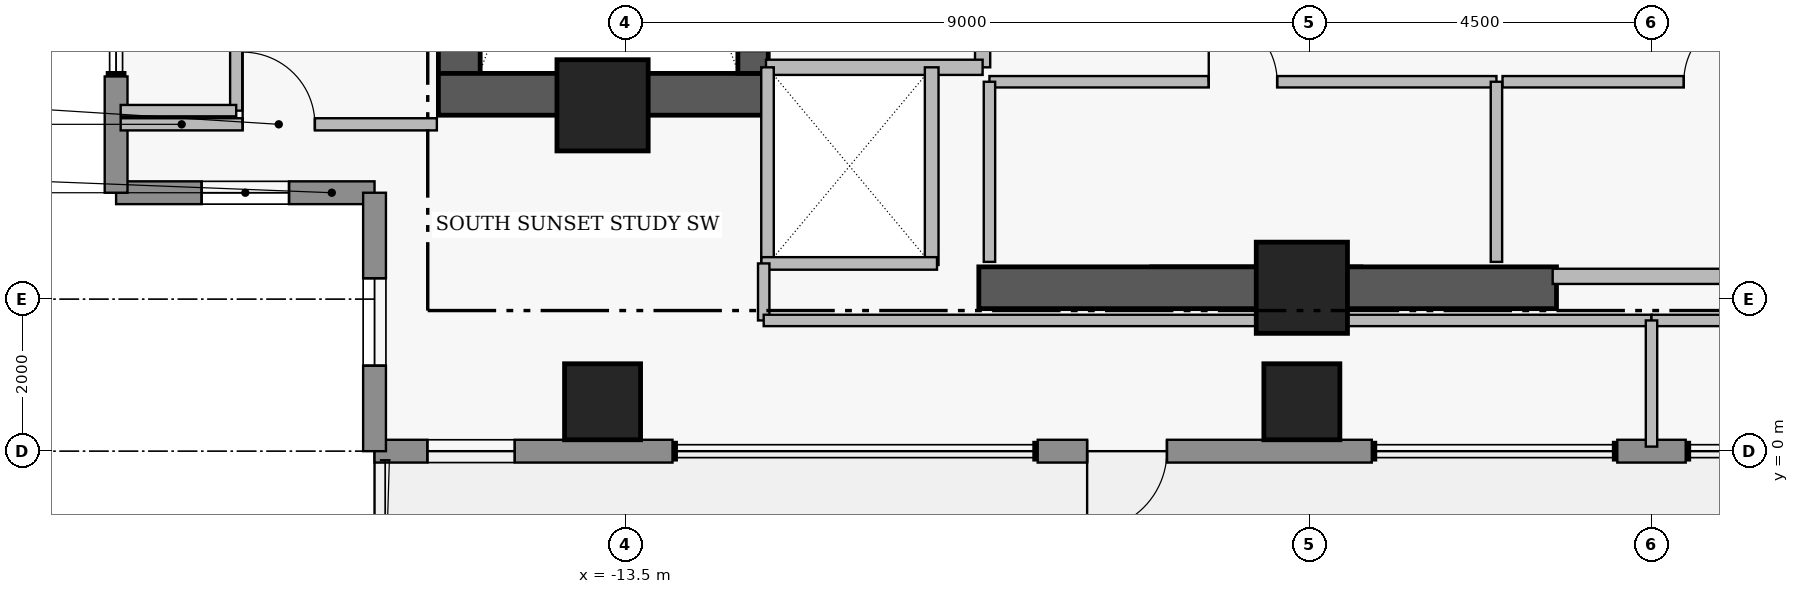
"""IFC4 building model, lengths in metres.
Left out: names, types, materials, properties, quantities, classifications, styles, units other than length and angle.
Written with IfcOpenShell. Run it as: python <this file> out.ifc"""

import sys

from ifc_helpers import new_model, si_unit, direction, frame, frame_2d, origin, origin_2d, place, context, subcontext, project, spatial, rectangle, extrude, element, fill, save


model = new_model("IFC4")
c1 = context("Model", 3, precision=1e-05, world=origin(), true_north=direction((0.0, 1.0)))
c2 = subcontext(c1, "Body", "Model", "MODEL_VIEW")
j1 = project(units=[si_unit("LENGTHUNIT", "METRE"), si_unit("PLANEANGLEUNIT", "RADIAN")], contexts=[c1])
p1 = place(None, origin())
s1 = spatial("IfcSite", under=j1, at=p1, CompositionType="ELEMENT")
p2 = place(p1, origin())
s2 = spatial("IfcBuilding", under=s1, at=p2, CompositionType="ELEMENT")
p3 = place(p2, frame((0.0, 0.0, 292.85)))
s3 = spatial("IfcBuildingStorey", under=s2, at=p3, CompositionType="ELEMENT", Elevation=292.85)
p4 = place(p3, frame((-15.685, 4.97, 0.0), z_axis=(0.0, 0.0, 1.0), x_axis=(0.0, 1.0, 0.0)))
e1 = element("IfcWall", 1, at=p4, inside=s3, PredefinedType="SHEAR", context=c2, shape_type="SweptSolid", body=[
    extrude(rectangle(XDim=8.96, YDim=0.55, at=frame_2d((4.48, 0.0))), origin(), (0.0, 0.0, 1.0), 4.21),
])
p5 = place(p3, frame((-15.96, 4.695, 0.0), z_axis=(0.0, 0.0, 1.0), x_axis=(1.0, 0.0, 0.0)))
e2 = element("IfcWall", 2, at=p5, inside=s3, PredefinedType="SHEAR", context=c2, shape_type="SweptSolid", body=[
    extrude(rectangle(XDim=4.36, YDim=0.55, at=frame_2d((2.18, 0.0))), origin(), (0.0, 0.0, 1.0), 4.21),
])
p6 = place(p3, frame((-8.85, 2.15, 0.0), z_axis=(0.0, 0.0, 1.0), x_axis=(1.0, 0.0, 0.0)))
e3 = element("IfcWall", 3, at=p6, inside=s3, PredefinedType="SHEAR", context=c2, shape_type="SweptSolid", body=[
    extrude(rectangle(XDim=7.6, YDim=0.55, at=frame_2d((3.8, 0.0))), origin(), (0.0, 0.0, 1.0), 4.16),
])
p7 = place(p3, frame((-11.82, 4.97, 0.0), z_axis=(0.0, 0.0, 1.0), x_axis=(0.0, 1.0, 0.0)))
e4 = element("IfcWall", 4, at=p7, inside=s3, PredefinedType="SHEAR", context=c2, shape_type="SweptSolid", body=[
    extrude(rectangle(XDim=8.96, YDim=0.4, at=frame_2d((4.48, 0.0))), origin(), (0.0, 0.0, 1.0), 4.21),
])
p8 = place(p7, frame((0.31, 0.0, 0.0)))
e5 = element("IfcOpeningElement", 5, at=p8, cuts=e4, PredefinedType="OPENING", context=c2, shape_type="SweptSolid", body=[
    extrude(rectangle(XDim=1.12, YDim=2.22, at=frame_2d((0.56, 1.11))), frame((0.0, 0.21, 0.0), z_axis=(0.0, -1.0, 0.0), x_axis=(1.0, 0.0, 0.0)), (0.0, 0.0, 1.0), 0.42),
])
for number, where, z_axis, x_axis in (
    (6, (-13.8, 4.55, 0.0), (0.0, 0.0, 1.0), (1.0, 0.0, 0.0)),
    (7, (-4.6, 2.15, 0.0), (0.0, 0.0, 1.0), (1.0, 0.0, 0.0)),
):
    element("IfcColumn", number, at=place(p3, frame(where, z_axis=z_axis, x_axis=x_axis)), inside=s3, PredefinedType="COLUMN", context=c2, shape_type="SweptSolid", body=[
        extrude(rectangle(XDim=1.2, YDim=1.2, at=origin_2d()), origin(), (0.0, 0.0, 1.0), 4.4),
    ])
for number, where, z_axis, x_axis in (
    (8, (-13.8, 0.65, 0.0), (0.0, 0.0, 1.0), (1.0, 0.0, 0.0)),
    (9, (-4.6, 0.65, 0.0), (0.0, 0.0, 1.0), (1.0, 0.0, 0.0)),
):
    element("IfcColumn", number, at=place(p3, frame(where, z_axis=z_axis, x_axis=x_axis)), inside=s3, PredefinedType="COLUMN", context=c2, shape_type="SweptSolid", body=[
        extrude(rectangle(XDim=1.0, YDim=1.0, at=origin_2d()), origin(), (0.0, 0.0, 1.0), 4.4),
    ])
p9 = place(p3, frame((-16.8, 3.4, 0.0), z_axis=(0.0, 0.0, 1.0), x_axis=(-1.0, 0.0, 0.0)))
e10 = element("IfcWall", 10, at=p9, inside=s3, PredefinedType="STANDARD", context=c2, shape_type="SweptSolid", body=[
    extrude(rectangle(XDim=3.4, YDim=0.3, at=frame_2d((1.7, 0.0))), origin(), (0.0, 0.0, 1.0), 4.16),
])
p10 = place(p9, frame((1.125, 0.0, 1.25)))
e11 = element("IfcOpeningElement", 11, at=p10, cuts=e10, PredefinedType="OPENING", context=c2, shape_type="SweptSolid", body=[
    extrude(rectangle(XDim=1.15, YDim=1.55, at=frame_2d((0.575, 0.775))), frame((0.0, 0.16, 0.0), z_axis=(0.0, -1.0, 0.0), x_axis=(1.0, 0.0, 0.0)), (0.0, 0.0, 1.0), 0.32),
])
p11 = place(p3, frame((-20.2, 3.4, 0.0), z_axis=(0.0, 0.0, 1.0), x_axis=(0.0, 1.0, 0.0)))
e12 = element("IfcWall", 12, at=p11, inside=s3, PredefinedType="STANDARD", context=c2, shape_type="SweptSolid", body=[
    extrude(rectangle(XDim=1.53, YDim=0.3, at=frame_2d((0.765, 0.0))), origin(), (0.0, 0.0, 1.0), 4.16),
])
p12 = place(p3, frame((0.45, 0.0, 0.0), z_axis=(0.0, 0.0, 1.0), x_axis=(-1.0, 0.0, 0.0)))
e13 = element("IfcWall", 13, at=p12, inside=s3, PredefinedType="STANDARD", context=c2, shape_type="SweptSolid", body=[
    extrude(rectangle(XDim=0.9, YDim=0.3, at=frame_2d((0.45, 0.0))), origin(), (0.0, 0.0, 1.0), 4.16),
])
p13 = place(p3, frame((-3.68, 0.0, 0.0), z_axis=(0.0, 0.0, 1.0), x_axis=(-1.0, 0.0, 0.0)))
e14 = element("IfcWall", 14, at=p13, inside=s3, PredefinedType="STANDARD", context=c2, shape_type="SweptSolid", body=[
    extrude(rectangle(XDim=4.395, YDim=0.3, at=frame_2d((2.198, 0.0))), origin(), (0.0, 0.0, 1.0), 4.16),
])
p14 = place(p13, frame((2.695, 0.0, 0.0)))
e15 = element("IfcOpeningElement", 15, at=p14, cuts=e14, PredefinedType="OPENING", context=c2, shape_type="SweptSolid", body=[
    extrude(rectangle(XDim=1.05, YDim=2.2, at=frame_2d((0.525, 1.1))), frame((0.0, 0.16, 0.0), z_axis=(0.0, -1.0, 0.0), x_axis=(1.0, 0.0, 0.0)), (0.0, 0.0, 1.0), 0.32),
])
p15 = place(p3, frame((-12.88, 0.0, 0.0), z_axis=(0.0, 0.0, 1.0), x_axis=(-1.0, 0.0, 0.0)))
e16 = element("IfcWall", 16, at=p15, inside=s3, PredefinedType="STANDARD", context=c2, shape_type="SweptSolid", body=[
    extrude(rectangle(XDim=3.92, YDim=0.3, at=frame_2d((1.96, 0.0))), origin(), (0.0, 0.0, 1.0), 4.16),
])
p16 = place(p15, frame((2.075, 0.0, 0.95)))
e17 = element("IfcOpeningElement", 17, at=p16, cuts=e16, PredefinedType="OPENING", context=c2, shape_type="SweptSolid", body=[
    extrude(rectangle(XDim=1.15, YDim=1.55, at=frame_2d((0.575, 0.775))), frame((0.0, 0.16, 0.0), z_axis=(0.0, -1.0, 0.0), x_axis=(1.0, 0.0, 0.0)), (0.0, 0.0, 1.0), 0.32),
])
p17 = place(p3, frame((-16.8, 0.0, 0.0), z_axis=(0.0, 0.0, 1.0), x_axis=(0.0, 1.0, 0.0)))
e18 = element("IfcWall", 18, at=p17, inside=s3, PredefinedType="STANDARD", context=c2, shape_type="SweptSolid", body=[
    extrude(rectangle(XDim=3.4, YDim=0.3, at=frame_2d((1.7, 0.0))), origin(), (0.0, 0.0, 1.0), 4.16),
])
p18 = place(p17, frame((1.125, 0.0, 1.25)))
e19 = element("IfcOpeningElement", 19, at=p18, cuts=e18, PredefinedType="OPENING", context=c2, shape_type="SweptSolid", body=[
    extrude(rectangle(XDim=1.15, YDim=1.55, at=frame_2d((0.575, 0.775))), frame((0.0, 0.16, 0.0), z_axis=(0.0, -1.0, 0.0), x_axis=(1.0, 0.0, 0.0)), (0.0, 0.0, 1.0), 0.32),
])
p19 = place(p3, frame((-8.8, 5.05, 0.0), z_axis=(0.0, 0.0, 1.0), x_axis=(0.0, 1.0, 0.0)))
e20 = element("IfcWall", 20, at=p19, inside=s3, PredefinedType="PARTITIONING", context=c2, shape_type="SweptSolid", body=[
    extrude(rectangle(XDim=6.1, YDim=0.2, at=frame_2d((3.05, 0.0))), origin(), (0.0, 0.0, 1.0), 4.16),
])
p20 = place(p19, frame((0.25, 0.0, 0.0)))
e21 = element("IfcOpeningElement", 21, at=p20, cuts=e20, PredefinedType="OPENING", context=c2, shape_type="SweptSolid", body=[
    extrude(rectangle(XDim=1.1, YDim=2.2, at=frame_2d((0.55, 1.1))), frame((0.0, 0.11, 0.0), z_axis=(0.0, -1.0, 0.0), x_axis=(1.0, 0.0, 0.0)), (0.0, 0.0, 1.0), 0.22),
])
p21 = place(p19, frame((3.85, 0.0, 0.0)))
e22 = element("IfcOpeningElement", 22, at=p21, cuts=e20, PredefinedType="OPENING", context=c2, shape_type="SweptSolid", body=[
    extrude(rectangle(XDim=1.1, YDim=2.2, at=frame_2d((0.55, 1.1))), frame((0.0, 0.11, 0.0), z_axis=(0.0, -1.0, 0.0), x_axis=(1.0, 0.0, 0.0)), (0.0, 0.0, 1.0), 0.22),
])
p22 = place(p3, frame((-8.71, 4.86, 0.0), z_axis=(0.0, 0.0, 1.0), x_axis=(1.0, 0.0, 0.0)))
e23 = element("IfcWall", 23, at=p22, inside=s3, PredefinedType="PARTITIONING", context=c2, shape_type="SweptSolid", body=[
    extrude(rectangle(XDim=6.67, YDim=0.15, at=frame_2d((3.335, 0.0))), origin(), (0.0, 0.0, 1.0), 4.16),
])
p23 = place(p22, frame((2.885, 0.0, 0.0)))
e24 = element("IfcOpeningElement", 24, at=p23, cuts=e23, PredefinedType="OPENING", context=c2, shape_type="SweptSolid", body=[
    extrude(rectangle(XDim=0.9, YDim=2.15, at=frame_2d((0.45, 1.075))), frame((0.0, 0.085, 0.0), z_axis=(0.0, -1.0, 0.0), x_axis=(1.0, 0.0, 0.0)), (0.0, 0.0, 1.0), 0.17),
])
p24 = place(p3, frame((-1.96, 4.86, 0.0), z_axis=(0.0, 0.0, 1.0), x_axis=(1.0, 0.0, 0.0)))
e25 = element("IfcWall", 25, at=p24, inside=s3, PredefinedType="PARTITIONING", context=c2, shape_type="SweptSolid", body=[
    extrude(rectangle(XDim=5.67, YDim=0.15, at=frame_2d((2.835, 0.0))), origin(), (0.0, 0.0, 1.0), 4.16),
])
p25 = place(p24, frame((2.385, 0.0, 0.0)))
e26 = element("IfcOpeningElement", 26, at=p25, cuts=e25, PredefinedType="OPENING", context=c2, shape_type="SweptSolid", body=[
    extrude(rectangle(XDim=0.9, YDim=2.15, at=frame_2d((0.45, 1.075))), frame((0.0, 0.085, 0.0), z_axis=(0.0, -1.0, 0.0), x_axis=(1.0, 0.0, 0.0)), (0.0, 0.0, 1.0), 0.17),
])
p26 = place(p3, frame((-20.14, 4.3, 0.0), z_axis=(0.0, 0.0, 1.0), x_axis=(1.0, 0.0, 0.0)))
e27 = element("IfcWall", 27, at=p26, inside=s3, PredefinedType="PARTITIONING", context=c2, shape_type="SweptSolid", body=[
    extrude(rectangle(XDim=4.16, YDim=0.16, at=frame_2d((2.08, 0.0))), origin(), (0.0, 0.0, 1.0), 4.16),
])
p27 = place(p26, frame((1.605, 0.0, 0.0)))
e28 = element("IfcOpeningElement", 28, at=p27, cuts=e27, PredefinedType="OPENING", context=c2, shape_type="SweptSolid", body=[
    extrude(rectangle(XDim=0.95, YDim=2.15, at=frame_2d((0.475, 1.075))), frame((0.0, 0.09, 0.0), z_axis=(0.0, -1.0, 0.0), x_axis=(1.0, 0.0, 0.0)), (0.0, 0.0, 1.0), 0.18),
])
p28 = place(p3, frame((-18.62, 4.48, 0.0), z_axis=(0.0, 0.0, 1.0), x_axis=(0.0, 1.0, 0.0)))
e29 = element("IfcWall", 29, at=p28, inside=s3, PredefinedType="PARTITIONING", context=c2, shape_type="SweptSolid", body=[
    extrude(rectangle(XDim=12.17, YDim=0.16, at=frame_2d((6.085, 0.0))), origin(), (0.0, 0.0, 1.0), 4.16),
])
p29 = place(p28, frame((5.625, 0.0, 0.0)))
e30 = element("IfcOpeningElement", 30, at=p29, cuts=e29, PredefinedType="OPENING", context=c2, shape_type="SweptSolid", body=[
    extrude(rectangle(XDim=0.92, YDim=2.12, at=frame_2d((0.46, 1.06))), frame((0.0, 0.09, 0.0), z_axis=(0.0, -1.0, 0.0), x_axis=(1.0, 0.0, 0.0)), (0.0, 0.0, 1.0), 0.18),
])
p30 = place(p3, frame((-11.65, 5.05, 0.0), z_axis=(0.0, 0.0, 1.0), x_axis=(1.0, 0.0, 0.0)))
e31 = element("IfcWall", 31, at=p30, inside=s3, PredefinedType="PARTITIONING", context=c2, shape_type="SweptSolid", body=[
    extrude(rectangle(XDim=2.85, YDim=0.2, at=frame_2d((1.425, 0.0))), origin(), (0.0, 0.0, 1.0), 4.16),
])
p31 = place(p3, frame((-1.3, 2.3, 0.0), z_axis=(0.0, 0.0, 1.0), x_axis=(1.0, 0.0, 0.0)))
e32 = element("IfcWall", 32, at=p31, inside=s3, PredefinedType="PARTITIONING", context=c2, shape_type="SweptSolid", body=[
    extrude(rectangle(XDim=2.6, YDim=0.2, at=frame_2d((1.3, 0.0))), origin(), (0.0, 0.0, 1.0), 3.06),
])
for number, where, z_axis, x_axis in (
    (33, (-8.71, 2.49, 0.0), (0.0, 0.0, 1.0), (0.0, 1.0, 0.0)),
    (34, (-2.04, 2.49, 0.0), (0.0, 0.0, 1.0), (0.0, 1.0, 0.0)),
):
    element("IfcWall", number, at=place(p3, frame(where, z_axis=z_axis, x_axis=x_axis)), inside=s3, PredefinedType="PARTITIONING", context=c2, shape_type="SweptSolid", body=[
        extrude(rectangle(XDim=2.37, YDim=0.15, at=frame_2d((1.185, 0.0))), origin(), (0.0, 0.0, 1.0), 4.16),
    ])
p32 = place(p3, frame((-9.47, 2.45, 0.0), z_axis=(0.0, 0.0, 1.0), x_axis=(0.0, 1.0, 0.0)))
e35 = element("IfcWall", 35, at=p32, inside=s3, PredefinedType="PARTITIONING", context=c2, shape_type="SweptSolid", body=[
    extrude(rectangle(XDim=2.6, YDim=0.18, at=frame_2d((1.3, 0.0))), origin(), (0.0, 0.0, 1.0), 4.16),
])
p33 = place(p3, frame((-11.63, 2.47, 0.0), z_axis=(0.0, 0.0, 1.0), x_axis=(0.0, 1.0, 0.0)))
e36 = element("IfcWall", 36, at=p33, inside=s3, PredefinedType="PARTITIONING", context=c2, shape_type="SweptSolid", body=[
    extrude(rectangle(XDim=2.58, YDim=0.165, at=frame_2d((1.29, 0.0))), origin(), (0.0, 0.0, 1.0), 4.16),
])
p34 = place(p3, frame((-11.71, 2.47, 0.0), z_axis=(0.0, 0.0, 1.0), x_axis=(1.0, 0.0, 0.0)))
e37 = element("IfcWall", 37, at=p34, inside=s3, PredefinedType="PARTITIONING", context=c2, shape_type="SweptSolid", body=[
    extrude(rectangle(XDim=2.31, YDim=0.165, at=frame_2d((1.155, 0.0))), origin(), (0.0, 0.0, 1.0), 3.06),
])
p35 = place(p3, frame((-11.68, 1.72, 0.0), z_axis=(0.0, 0.0, 1.0), x_axis=(0.0, 1.0, 0.0)))
e38 = element("IfcWall", 38, at=p35, inside=s3, PredefinedType="PARTITIONING", context=c2, shape_type="SweptSolid", body=[
    extrude(rectangle(XDim=0.75, YDim=0.15, at=frame_2d((0.375, 0.0))), origin(), (0.0, 0.0, 1.0), 4.16),
])
for number, where, z_axis, x_axis in (
    (39, (-11.68, 1.72, 0.0), (0.0, 0.0, 1.0), (1.0, 0.0, 0.0)),
    (40, (0.0, 1.72, 0.0), (0.0, 0.0, 1.0), (1.0, 0.0, 0.0)),
):
    element("IfcWall", number, at=place(p3, frame(where, z_axis=z_axis, x_axis=x_axis)), inside=s3, PredefinedType="PARTITIONING", context=c2, shape_type="SweptSolid", body=[
        extrude(rectangle(XDim=11.68, YDim=0.15, at=frame_2d((5.84, 0.0))), origin(), (0.0, 0.0, 1.0), 3.06),
    ])
p36 = place(p3, frame((0.0, 0.06, 0.0), z_axis=(0.0, 0.0, 1.0), x_axis=(0.0, 1.0, 0.0)))
e41 = element("IfcWall", 41, at=p36, inside=s3, PredefinedType="PARTITIONING", context=c2, shape_type="SweptSolid", body=[
    extrude(rectangle(XDim=1.66, YDim=0.15, at=frame_2d((0.83, 0.0))), origin(), (0.0, 0.0, 1.0), 4.16),
])
p37 = place(p3, frame((-20.14, 4.48, 0.0), z_axis=(0.0, 0.0, 1.0), x_axis=(1.0, 0.0, 0.0)))
e42 = element("IfcWall", 42, at=p37, inside=s3, PredefinedType="PARTITIONING", context=c2, shape_type="SweptSolid", body=[
    extrude(rectangle(XDim=1.52, YDim=0.15, at=frame_2d((0.76, 0.0))), origin(), (0.0, 0.0, 1.0), 4.16),
])
p38 = place(p10, origin())
e43 = element("IfcWindow", 43, at=p38, inside=s3, PartitioningType="SINGLE_PANEL", PredefinedType="WINDOW", context=c2, shape_type="SweptSolid", body=[
    extrude(rectangle(XDim=1.15, YDim=1.55, at=frame_2d((0.575, 0.775))), frame((0.0, 0.03, 0.0), z_axis=(0.0, -1.0, 0.0), x_axis=(1.0, 0.0, 0.0)), (0.0, 0.0, 1.0), 0.06),
])
fill(e11, e43)
p39 = place(p14, origin())
e44 = element("IfcDoor", 44, at=p39, inside=s3, OperationType="SINGLE_SWING_RIGHT", PredefinedType="DOOR", context=c2, shape_type="SweptSolid", body=[
    extrude(rectangle(XDim=1.05, YDim=2.2, at=frame_2d((0.525, 1.1))), frame((0.0, 0.025, 0.0), z_axis=(0.0, -1.0, 0.0), x_axis=(1.0, 0.0, 0.0)), (0.0, 0.0, 1.0), 0.05),
])
fill(e15, e44)
p40 = place(p16, origin())
e45 = element("IfcWindow", 45, at=p40, inside=s3, PartitioningType="SINGLE_PANEL", PredefinedType="WINDOW", context=c2, shape_type="SweptSolid", body=[
    extrude(rectangle(XDim=1.15, YDim=1.55, at=frame_2d((0.575, 0.775))), frame((0.0, 0.03, 0.0), z_axis=(0.0, -1.0, 0.0), x_axis=(1.0, 0.0, 0.0)), (0.0, 0.0, 1.0), 0.06),
])
fill(e17, e45)
p41 = place(p18, origin())
e46 = element("IfcWindow", 46, at=p41, inside=s3, PartitioningType="SINGLE_PANEL", PredefinedType="WINDOW", context=c2, shape_type="SweptSolid", body=[
    extrude(rectangle(XDim=1.15, YDim=1.55, at=frame_2d((0.575, 0.775))), frame((0.0, 0.03, 0.0), z_axis=(0.0, -1.0, 0.0), x_axis=(1.0, 0.0, 0.0)), (0.0, 0.0, 1.0), 0.06),
])
fill(e19, e46)
p42 = place(p23, origin())
e47 = element("IfcDoor", 47, at=p42, inside=s3, OperationType="SINGLE_SWING_LEFT", PredefinedType="DOOR", context=c2, shape_type="SweptSolid", body=[
    extrude(rectangle(XDim=0.9, YDim=2.15, at=frame_2d((0.45, 1.075))), frame((0.0, 0.025, 0.0), z_axis=(0.0, -1.0, 0.0), x_axis=(1.0, 0.0, 0.0)), (0.0, 0.0, 1.0), 0.05),
])
fill(e24, e47)
p43 = place(p25, origin())
e48 = element("IfcDoor", 48, at=p43, inside=s3, OperationType="SINGLE_SWING_RIGHT", PredefinedType="DOOR", context=c2, shape_type="SweptSolid", body=[
    extrude(rectangle(XDim=0.9, YDim=2.15, at=frame_2d((0.45, 1.075))), frame((0.0, 0.025, 0.0), z_axis=(0.0, -1.0, 0.0), x_axis=(1.0, 0.0, 0.0)), (0.0, 0.0, 1.0), 0.05),
])
fill(e26, e48)
p44 = place(p27, origin())
e49 = element("IfcDoor", 49, at=p44, inside=s3, OperationType="SINGLE_SWING_LEFT", PredefinedType="DOOR", context=c2, shape_type="SweptSolid", body=[
    extrude(rectangle(XDim=0.95, YDim=2.15, at=frame_2d((0.475, 1.075))), frame((0.0, 0.025, 0.0), z_axis=(0.0, -1.0, 0.0), x_axis=(1.0, 0.0, 0.0)), (0.0, 0.0, 1.0), 0.05),
])
fill(e28, e49)
save(model, sys.argv[1])
